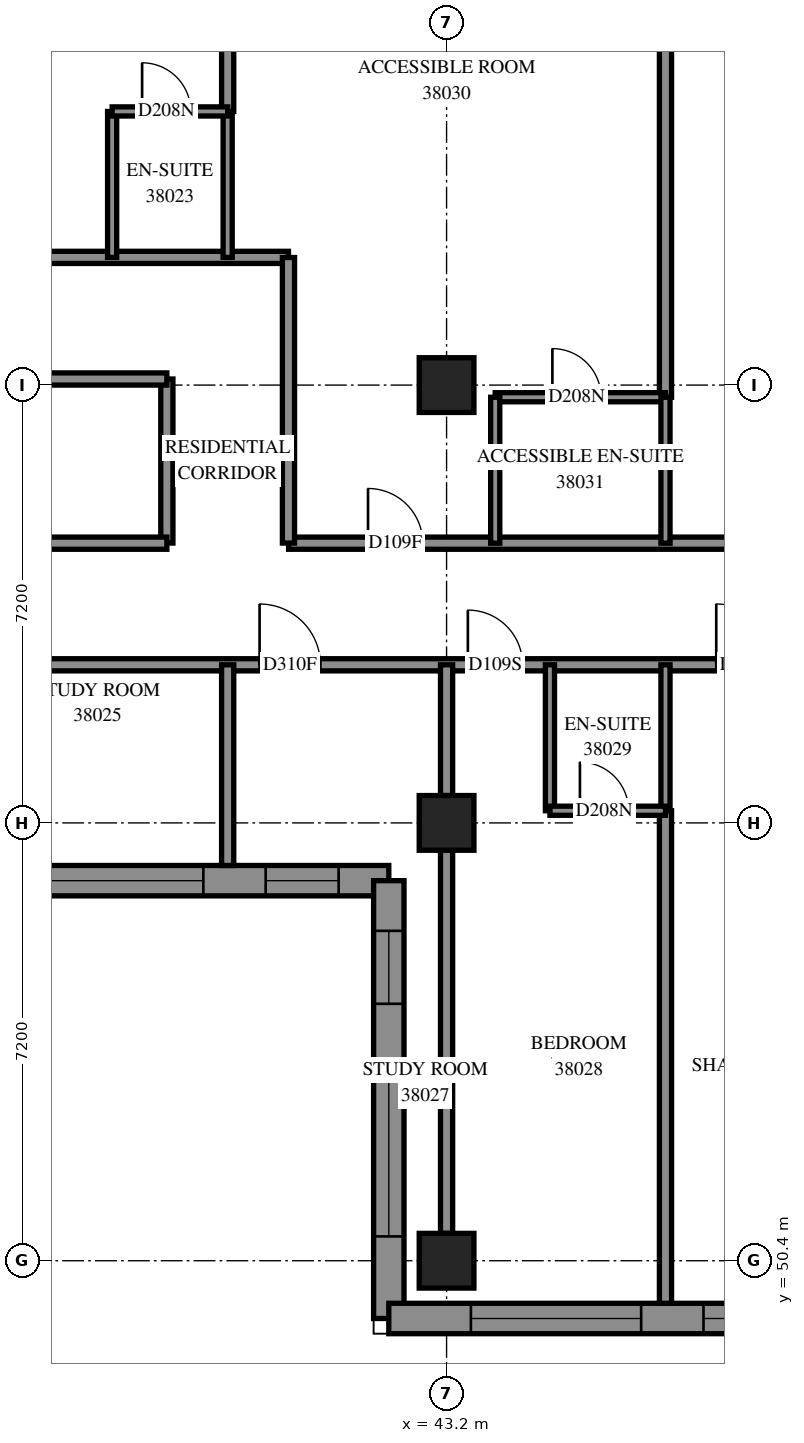
"""IFC4 building model, lengths in metres.
Left out: names, types, materials, properties, quantities, classifications, styles, units other than length and angle.
Written with IfcOpenShell. Run it as: python <this file> out.ifc"""

import sys

from ifc_helpers import new_model, si_unit, direction, frame, frame_2d, origin, origin_2d, place, context, subcontext, project, spatial, polyline, rectangle, outline, extrude, element, fill, save


model = new_model("IFC4")
c1 = context("Model", 3, precision=1e-05, world=origin(), true_north=direction((0.0, 1.0)))
c2 = subcontext(c1, "Body", "Model", "MODEL_VIEW")
j1 = project(units=[si_unit("LENGTHUNIT", "METRE"), si_unit("PLANEANGLEUNIT", "RADIAN")], contexts=[c1])
p1 = place(None, origin())
s1 = spatial("IfcSite", under=j1, at=p1, CompositionType="ELEMENT")
p2 = place(p1, origin())
s2 = spatial("IfcBuilding", under=s1, at=p2, CompositionType="ELEMENT")
p3 = place(p2, frame((0.0, 0.0, 142.2)))
s3 = spatial("IfcBuildingStorey", under=s2, at=p3, CompositionType="ELEMENT", Elevation=142.2)
for number, where, z_axis, x_axis in (
    (1, (43.2, 50.4, 0.0), (0.0, 0.0, 1.0), (1.0, 0.0, 0.0)),
    (2, (43.2, 57.6, 0.0), (0.0, 0.0, 1.0), (1.0, 0.0, 0.0)),
    (3, (43.2, 64.8, 0.0), (0.0, 0.0, 1.0), (1.0, 0.0, 0.0)),
):
    element("IfcColumn", number, at=place(p3, frame(where, z_axis=z_axis, x_axis=x_axis)), inside=s3, PredefinedType="COLUMN", context=c2, shape_type="SweptSolid", body=[
        extrude(rectangle(XDim=0.9, YDim=0.9, at=origin_2d()), origin(), (0.0, 0.0, 1.0), 3.1),
    ])
p4 = place(p3, frame((35.05, 56.65, 0.0), z_axis=(0.0, 0.0, 1.0), x_axis=(1.0, 0.0, 0.0)))
e4 = element("IfcWall", 4, at=p4, inside=s3, PredefinedType="SOLIDWALL", context=c2, shape_type="SweptSolid", body=[
    extrude(outline(polyline([(-0.25, -0.25), (6.95, -0.25), (7.45, 0.25), (0.25, 0.25), (-0.25, -0.25)])), origin(), (0.0, 0.0, 1.0), 3.1),
])
p5 = place(p4, frame((1.35, 0.0, 0.45)))
e5 = element("IfcOpeningElement", 5, at=p5, cuts=e4, PredefinedType="OPENING", context=c2, shape_type="SweptSolid", body=[
    extrude(rectangle(XDim=2.8, YDim=2.5, at=frame_2d((1.4, 1.25))), frame((0.0, 0.26, 0.0), z_axis=(0.0, -1.0, 0.0), x_axis=(1.0, 0.0, 0.0)), (0.0, 0.0, 1.0), 0.52),
])
p6 = place(p4, frame((5.175, 0.0, 0.45)))
e6 = element("IfcOpeningElement", 6, at=p6, cuts=e4, PredefinedType="OPENING", context=c2, shape_type="SweptSolid", body=[
    extrude(rectangle(XDim=1.2, YDim=2.5, at=frame_2d((0.6, 1.25))), frame((0.0, 0.26, 0.0), z_axis=(0.0, -1.0, 0.0), x_axis=(1.0, 0.0, 0.0)), (0.0, 0.0, 1.0), 0.52),
])
p7 = place(p3, frame((42.25, 56.65, 0.0), z_axis=(0.0, 0.0, 1.0), x_axis=(0.0, -1.0, 0.0)))
e7 = element("IfcWall", 7, at=p7, inside=s3, PredefinedType="SOLIDWALL", context=c2, shape_type="SweptSolid", body=[
    extrude(outline(polyline([(0.25, -0.25), (7.45, -0.25), (6.95, 0.25), (-0.25, 0.25), (0.25, -0.25)])), origin(), (0.0, 0.0, 1.0), 3.1),
])
p8 = place(p7, frame((3.05, 0.0, 0.45)))
e8 = element("IfcOpeningElement", 8, at=p8, cuts=e7, PredefinedType="OPENING", context=c2, shape_type="SweptSolid", body=[
    extrude(rectangle(XDim=2.8, YDim=2.5, at=frame_2d((1.4, 1.25))), frame((0.0, 0.26, 0.0), z_axis=(0.0, -1.0, 0.0), x_axis=(1.0, 0.0, 0.0)), (0.0, 0.0, 1.0), 0.52),
])
p9 = place(p7, frame((0.825, 0.0, 0.45)))
e9 = element("IfcOpeningElement", 9, at=p9, cuts=e7, PredefinedType="OPENING", context=c2, shape_type="SweptSolid", body=[
    extrude(rectangle(XDim=1.2, YDim=2.5, at=frame_2d((0.6, 1.25))), frame((0.0, 0.26, 0.0), z_axis=(0.0, -1.0, 0.0), x_axis=(1.0, 0.0, 0.0)), (0.0, 0.0, 1.0), 0.52),
])
p10 = place(p3, frame((42.25, 49.45, 0.0), z_axis=(0.0, 0.0, 1.0), x_axis=(1.0, 0.0, 0.0)))
e10 = element("IfcWall", 10, at=p10, inside=s3, PredefinedType="SOLIDWALL", context=c2, shape_type="SweptSolid", body=[
    extrude(outline(polyline([(-0.25, -0.25), (6.95, -0.25), (7.45, 0.25), (0.25, 0.25), (-0.25, -0.25)])), origin(), (0.0, 0.0, 1.0), 3.1),
])
p11 = place(p10, frame((1.35, 0.0, 0.45)))
e11 = element("IfcOpeningElement", 11, at=p11, cuts=e10, PredefinedType="OPENING", context=c2, shape_type="SweptSolid", body=[
    extrude(rectangle(XDim=2.8, YDim=2.5, at=frame_2d((1.4, 1.25))), frame((0.0, 0.26, 0.0), z_axis=(0.0, -1.0, 0.0), x_axis=(1.0, 0.0, 0.0)), (0.0, 0.0, 1.0), 0.52),
])
p12 = place(p10, frame((5.175, 0.0, 0.45)))
e12 = element("IfcOpeningElement", 12, at=p12, cuts=e10, PredefinedType="OPENING", context=c2, shape_type="SweptSolid", body=[
    extrude(rectangle(XDim=1.2, YDim=2.5, at=frame_2d((0.6, 1.25))), frame((0.0, 0.26, 0.0), z_axis=(0.0, -1.0, 0.0), x_axis=(1.0, 0.0, 0.0)), (0.0, 0.0, 1.0), 0.52),
])
p13 = place(p3, frame((21.6, 66.9, 0.0), z_axis=(0.0, 0.0, 1.0), x_axis=(1.0, 0.0, 0.0)))
e13 = element("IfcWall", 13, at=p13, inside=s3, PredefinedType="PARTITIONING", context=c2, shape_type="SweptSolid", body=[
    extrude(rectangle(XDim=19.0, YDim=0.2, at=frame_2d((9.5, 0.0))), origin(), (0.0, 0.0, 1.0), 3.1),
])
p14 = place(p13, frame((2.3, 0.0, 0.0)))
e14 = element("IfcOpeningElement", 14, at=p14, cuts=e13, PredefinedType="OPENING", context=c2, shape_type="SweptSolid", body=[
    extrude(rectangle(XDim=0.9, YDim=2.1, at=frame_2d((0.45, 1.05))), frame((0.0, 0.11, 0.0), z_axis=(0.0, -1.0, 0.0), x_axis=(1.0, 0.0, 0.0)), (0.0, 0.0, 1.0), 0.22),
])
p15 = place(p13, frame((5.957, 0.0, 0.0)))
e15 = element("IfcOpeningElement", 15, at=p15, cuts=e13, PredefinedType="OPENING", context=c2, shape_type="SweptSolid", body=[
    extrude(rectangle(XDim=0.9, YDim=2.1, at=frame_2d((0.45, 1.05))), frame((0.0, 0.11, 0.0), z_axis=(0.0, -1.0, 0.0), x_axis=(1.0, 0.0, 0.0)), (0.0, 0.0, 1.0), 0.22),
])
p16 = place(p13, frame((13.057, 0.0, 0.0)))
e16 = element("IfcOpeningElement", 16, at=p16, cuts=e13, PredefinedType="OPENING", context=c2, shape_type="SweptSolid", body=[
    extrude(rectangle(XDim=0.9, YDim=2.1, at=frame_2d((0.45, 1.05))), frame((0.0, 0.11, 0.0), z_axis=(0.0, -1.0, 0.0), x_axis=(1.0, 0.0, 0.0)), (0.0, 0.0, 1.0), 0.22),
])
p17 = place(p3, frame((36.0, 60.2, 0.0), z_axis=(0.0, 0.0, 1.0), x_axis=(1.0, 0.0, 0.0)))
e17 = element("IfcWall", 17, at=p17, inside=s3, PredefinedType="PARTITIONING", context=c2, shape_type="SweptSolid", body=[
    extrude(rectangle(XDim=17.0, YDim=0.2, at=frame_2d((8.5, 0.0))), origin(), (0.0, 0.0, 1.0), 3.1),
])
p18 = place(p17, frame((15.805, 0.0, 0.0)))
e18 = element("IfcOpeningElement", 18, at=p18, cuts=e17, PredefinedType="OPENING", context=c2, shape_type="SweptSolid", body=[
    extrude(rectangle(XDim=1.0, YDim=2.1, at=frame_2d((0.5, 1.05))), frame((0.0, 0.11, 0.0), z_axis=(0.0, -1.0, 0.0), x_axis=(1.0, 0.0, 0.0)), (0.0, 0.0, 1.0), 0.22),
])
p19 = place(p17, frame((4.125, 0.0, 0.0)))
e19 = element("IfcOpeningElement", 19, at=p19, cuts=e17, PredefinedType="OPENING", context=c2, shape_type="SweptSolid", body=[
    extrude(rectangle(XDim=1.0, YDim=2.1, at=frame_2d((0.5, 1.05))), frame((0.0, 0.11, 0.0), z_axis=(0.0, -1.0, 0.0), x_axis=(1.0, 0.0, 0.0)), (0.0, 0.0, 1.0), 0.22),
])
p20 = place(p17, frame((7.55, 0.0, 0.0)))
e20 = element("IfcOpeningElement", 20, at=p20, cuts=e17, PredefinedType="OPENING", context=c2, shape_type="SweptSolid", body=[
    extrude(rectangle(XDim=0.9, YDim=2.1, at=frame_2d((0.45, 1.05))), frame((0.0, 0.11, 0.0), z_axis=(0.0, -1.0, 0.0), x_axis=(1.0, 0.0, 0.0)), (0.0, 0.0, 1.0), 0.22),
])
p21 = place(p17, frame((11.635, 0.0, 0.0)))
e21 = element("IfcOpeningElement", 21, at=p21, cuts=e17, PredefinedType="OPENING", context=c2, shape_type="SweptSolid", body=[
    extrude(rectangle(XDim=1.0, YDim=2.1, at=frame_2d((0.5, 1.05))), frame((0.0, 0.11, 0.0), z_axis=(0.0, -1.0, 0.0), x_axis=(1.0, 0.0, 0.0)), (0.0, 0.0, 1.0), 0.22),
])
p22 = place(p3, frame((40.602, 62.2, 0.0), z_axis=(0.0, 0.0, 1.0), x_axis=(1.0, 0.0, 0.0)))
e22 = element("IfcWall", 22, at=p22, inside=s3, PredefinedType="PARTITIONING", context=c2, shape_type="SweptSolid", body=[
    extrude(rectangle(XDim=14.298, YDim=0.2, at=frame_2d((7.149, 0.0))), origin(), (0.0, 0.0, 1.0), 3.1),
])
p23 = place(p22, frame((1.306, 0.0, 0.0)))
e23 = element("IfcOpeningElement", 23, at=p23, cuts=e22, PredefinedType="OPENING", context=c2, shape_type="SweptSolid", body=[
    extrude(rectangle(XDim=0.9, YDim=2.1, at=frame_2d((0.45, 1.05))), frame((0.0, 0.11, 0.0), z_axis=(0.0, -1.0, 0.0), x_axis=(1.0, 0.0, 0.0)), (0.0, 0.0, 1.0), 0.22),
])
p24 = place(p22, frame((8.455, 0.0, 0.0)))
e24 = element("IfcOpeningElement", 24, at=p24, cuts=e22, PredefinedType="OPENING", context=c2, shape_type="SweptSolid", body=[
    extrude(rectangle(XDim=0.9, YDim=2.1, at=frame_2d((0.45, 1.05))), frame((0.0, 0.11, 0.0), z_axis=(0.0, -1.0, 0.0), x_axis=(1.0, 0.0, 0.0)), (0.0, 0.0, 1.0), 0.22),
])
p25 = place(p3, frame((46.8, 64.6, 0.0), z_axis=(0.0, 0.0, 1.0), x_axis=(0.0, 1.0, 0.0)))
e25 = element("IfcWall", 25, at=p25, inside=s3, PredefinedType="PARTITIONING", context=c2, shape_type="SweptSolid", body=[
    extrude(rectangle(XDim=8.176, YDim=0.2, at=frame_2d((4.088, 0.0))), origin(), (0.0, 0.0, 1.0), 3.1),
])
p26 = place(p3, frame((46.8, 49.7, 0.0), z_axis=(0.0, 0.0, 1.0), x_axis=(0.0, 1.0, 0.0)))
e26 = element("IfcWall", 26, at=p26, inside=s3, PredefinedType="PARTITIONING", context=c2, shape_type="SweptSolid", body=[
    extrude(rectangle(XDim=8.1, YDim=0.2, at=frame_2d((4.05, 0.0))), origin(), (0.0, 0.0, 1.0), 3.1),
])
p27 = place(p3, frame((43.2, 50.85, 0.0), z_axis=(0.0, 0.0, 1.0), x_axis=(0.0, 1.0, 0.0)))
e27 = element("IfcWall", 27, at=p27, inside=s3, PredefinedType="PARTITIONING", context=c2, shape_type="SweptSolid", body=[
    extrude(rectangle(XDim=6.3, YDim=0.2, at=frame_2d((3.15, 0.0))), origin(), (0.0, 0.0, 1.0), 2.6),
])
p28 = place(p3, frame((40.6, 62.202, 0.0), z_axis=(0.0, 0.0, 1.0), x_axis=(0.0, 1.0, 0.0)))
e28 = element("IfcWall", 28, at=p28, inside=s3, PredefinedType="PARTITIONING", context=c2, shape_type="SweptSolid", body=[
    extrude(rectangle(XDim=4.696, YDim=0.2, at=frame_2d((2.348, 0.0))), origin(), (0.0, 0.0, 1.0), 3.1),
])
p29 = place(p3, frame((39.6, 69.3, 0.0), z_axis=(0.0, 0.0, 1.0), x_axis=(0.0, 1.0, 0.0)))
e29 = element("IfcWall", 29, at=p29, inside=s3, PredefinedType="PARTITIONING", context=c2, shape_type="SweptSolid", body=[
    extrude(rectangle(XDim=3.513, YDim=0.2, at=frame_2d((1.756, 0.0))), origin(), (0.0, 0.0, 1.0), 3.1),
])
p30 = place(p3, frame((39.6, 56.9, 0.0), z_axis=(0.0, 0.0, 1.0), x_axis=(0.0, 1.0, 0.0)))
e30 = element("IfcWall", 30, at=p30, inside=s3, PredefinedType="PARTITIONING", context=c2, shape_type="SweptSolid", body=[
    extrude(rectangle(XDim=3.3, YDim=0.2, at=frame_2d((1.65, 0.0))), origin(), (0.0, 0.0, 1.0), 3.1),
])
p31 = place(p3, frame((44.0, 64.6, 0.0), z_axis=(0.0, 0.0, 1.0), x_axis=(1.0, 0.0, 0.0)))
e31 = element("IfcWall", 31, at=p31, inside=s3, PredefinedType="PARTITIONING", context=c2, shape_type="SweptSolid", body=[
    extrude(rectangle(XDim=2.8, YDim=0.15, at=frame_2d((1.4, 0.0))), origin(), (0.0, 0.0, 1.0), 3.1),
])
p32 = place(p31, frame((0.94, 0.0, 0.0)))
e32 = element("IfcOpeningElement", 32, at=p32, cuts=e31, PredefinedType="OPENING", context=c2, shape_type="SweptSolid", body=[
    extrude(rectangle(XDim=0.8, YDim=2.1, at=frame_2d((0.4, 1.05))), frame((0.0, 0.085, 0.0), z_axis=(0.0, -1.0, 0.0), x_axis=(1.0, 0.0, 0.0)), (0.0, 0.0, 1.0), 0.17),
])
p33 = place(p3, frame((38.6, 62.202, 0.0), z_axis=(0.0, 0.0, 1.0), x_axis=(0.0, 1.0, 0.0)))
e33 = element("IfcWall", 33, at=p33, inside=s3, PredefinedType="PARTITIONING", context=c2, shape_type="SweptSolid", body=[
    extrude(rectangle(XDim=2.698, YDim=0.2, at=frame_2d((1.349, 0.0))), origin(), (0.0, 0.0, 1.0), 3.1),
])
p34 = place(p3, frame((36.002, 62.2, 0.0), z_axis=(0.0, 0.0, 1.0), x_axis=(1.0, 0.0, 0.0)))
e34 = element("IfcWall", 34, at=p34, inside=s3, PredefinedType="PARTITIONING", context=c2, shape_type="SweptSolid", body=[
    extrude(rectangle(XDim=2.598, YDim=0.2, at=frame_2d((1.299, 0.0))), origin(), (0.0, 0.0, 1.0), 3.1),
])
for number, where, z_axis, x_axis in (
    (35, (44.9, 57.8, 0.0), (0.0, 0.0, 1.0), (0.0, 1.0, 0.0)),
    (36, (46.8, 57.8, 0.0), (0.0, 0.0, 1.0), (0.0, 1.0, 0.0)),
    (37, (37.7, 66.9, 0.0), (0.0, 0.0, 1.0), (0.0, 1.0, 0.0)),
    (38, (39.6, 66.9, 0.0), (0.0, 0.0, 1.0), (0.0, 1.0, 0.0)),
    (39, (44.0, 62.2, 0.0), (0.0, 0.0, 1.0), (0.0, 1.0, 0.0)),
    (40, (46.8, 62.2, 0.0), (0.0, 0.0, 1.0), (0.0, 1.0, 0.0)),
):
    element("IfcWall", number, at=place(p3, frame(where, z_axis=z_axis, x_axis=x_axis)), inside=s3, PredefinedType="PARTITIONING", context=c2, shape_type="SweptSolid", body=[
        extrude(rectangle(XDim=2.4, YDim=0.15, at=frame_2d((1.2, 0.0))), origin(), (0.0, 0.0, 1.0), 3.1),
    ])
for number, where, z_axis, x_axis in (
    (41, (43.2, 58.05, 0.0), (0.0, 0.0, 1.0), (0.0, 1.0, 0.0)),
    (42, (36.45, 64.9, 0.0), (0.0, 0.0, 1.0), (1.0, 0.0, 0.0)),
):
    element("IfcWall", number, at=place(p3, frame(where, z_axis=z_axis, x_axis=x_axis)), inside=s3, PredefinedType="PARTITIONING", context=c2, shape_type="SweptSolid", body=[
        extrude(rectangle(XDim=2.15, YDim=0.2, at=frame_2d((1.075, 0.0))), origin(), (0.0, 0.0, 1.0), 3.1),
    ])
p35 = place(p3, frame((37.7, 69.3, 0.0), z_axis=(0.0, 0.0, 1.0), x_axis=(1.0, 0.0, 0.0)))
e43 = element("IfcWall", 43, at=p35, inside=s3, PredefinedType="PARTITIONING", context=c2, shape_type="SweptSolid", body=[
    extrude(rectangle(XDim=1.9, YDim=0.15, at=frame_2d((0.95, 0.0))), origin(), (0.0, 0.0, 1.0), 3.1),
])
p36 = place(p35, frame((0.493, 0.0, 0.0)))
e44 = element("IfcOpeningElement", 44, at=p36, cuts=e43, PredefinedType="OPENING", context=c2, shape_type="SweptSolid", body=[
    extrude(rectangle(XDim=0.8, YDim=2.1, at=frame_2d((0.4, 1.05))), frame((0.0, 0.085, 0.0), z_axis=(0.0, -1.0, 0.0), x_axis=(1.0, 0.0, 0.0)), (0.0, 0.0, 1.0), 0.17),
])
p37 = place(p3, frame((44.9, 57.8, 0.0), z_axis=(0.0, 0.0, 1.0), x_axis=(1.0, 0.0, 0.0)))
e45 = element("IfcWall", 45, at=p37, inside=s3, PredefinedType="PARTITIONING", context=c2, shape_type="SweptSolid", body=[
    extrude(rectangle(XDim=1.9, YDim=0.15, at=frame_2d((0.95, 0.0))), origin(), (0.0, 0.0, 1.0), 3.1),
])
p38 = place(p37, frame((0.493, 0.0, 0.0)))
e46 = element("IfcOpeningElement", 46, at=p38, cuts=e45, PredefinedType="OPENING", context=c2, shape_type="SweptSolid", body=[
    extrude(rectangle(XDim=0.8, YDim=2.1, at=frame_2d((0.4, 1.05))), frame((0.0, 0.085, 0.0), z_axis=(0.0, -1.0, 0.0), x_axis=(1.0, 0.0, 0.0)), (0.0, 0.0, 1.0), 0.17),
])
p39 = place(p5, origin())
e47 = element("IfcWindow", 47, at=p39, inside=s3, PartitioningType="SINGLE_PANEL", PredefinedType="WINDOW", context=c2, shape_type="SweptSolid", body=[
    extrude(rectangle(XDim=2.8, YDim=2.5, at=frame_2d((1.4, 1.25))), frame((0.0, 0.18, 0.0), z_axis=(0.0, -1.0, 0.0), x_axis=(1.0, 0.0, 0.0)), (0.0, 0.0, 1.0), 0.06),
])
fill(e5, e47)
p40 = place(p6, origin())
e48 = element("IfcWindow", 48, at=p40, inside=s3, PartitioningType="SINGLE_PANEL", PredefinedType="WINDOW", context=c2, shape_type="SweptSolid", body=[
    extrude(rectangle(XDim=1.2, YDim=2.5, at=frame_2d((0.6, 1.25))), frame((0.0, 0.18, 0.0), z_axis=(0.0, -1.0, 0.0), x_axis=(1.0, 0.0, 0.0)), (0.0, 0.0, 1.0), 0.06),
])
fill(e6, e48)
p41 = place(p8, origin())
e49 = element("IfcWindow", 49, at=p41, inside=s3, PartitioningType="SINGLE_PANEL", PredefinedType="WINDOW", context=c2, shape_type="SweptSolid", body=[
    extrude(rectangle(XDim=2.8, YDim=2.5, at=frame_2d((1.4, 1.25))), frame((0.0, 0.18, 0.0), z_axis=(0.0, -1.0, 0.0), x_axis=(1.0, 0.0, 0.0)), (0.0, 0.0, 1.0), 0.06),
])
fill(e8, e49)
p42 = place(p9, origin())
e50 = element("IfcWindow", 50, at=p42, inside=s3, PartitioningType="SINGLE_PANEL", PredefinedType="WINDOW", context=c2, shape_type="SweptSolid", body=[
    extrude(rectangle(XDim=1.2, YDim=2.5, at=frame_2d((0.6, 1.25))), frame((0.0, 0.18, 0.0), z_axis=(0.0, -1.0, 0.0), x_axis=(1.0, 0.0, 0.0)), (0.0, 0.0, 1.0), 0.06),
])
fill(e9, e50)
p43 = place(p11, origin())
e51 = element("IfcWindow", 51, at=p43, inside=s3, PartitioningType="SINGLE_PANEL", PredefinedType="WINDOW", context=c2, shape_type="SweptSolid", body=[
    extrude(rectangle(XDim=2.8, YDim=2.5, at=frame_2d((1.4, 1.25))), frame((0.0, 0.18, 0.0), z_axis=(0.0, -1.0, 0.0), x_axis=(1.0, 0.0, 0.0)), (0.0, 0.0, 1.0), 0.06),
])
fill(e11, e51)
p44 = place(p12, origin())
e52 = element("IfcWindow", 52, at=p44, inside=s3, PartitioningType="SINGLE_PANEL", PredefinedType="WINDOW", context=c2, shape_type="SweptSolid", body=[
    extrude(rectangle(XDim=1.2, YDim=2.5, at=frame_2d((0.6, 1.25))), frame((0.0, 0.18, 0.0), z_axis=(0.0, -1.0, 0.0), x_axis=(1.0, 0.0, 0.0)), (0.0, 0.0, 1.0), 0.06),
])
fill(e12, e52)
p45 = place(p36, origin())
e53 = element("IfcDoor", 53, at=p45, inside=s3, OperationType="SINGLE_SWING_RIGHT", PredefinedType="DOOR", context=c2, shape_type="SweptSolid", body=[
    extrude(rectangle(XDim=0.8, YDim=2.1, at=frame_2d((0.4, 1.05))), frame((0.0, 0.025, 0.0), z_axis=(0.0, -1.0, 0.0), x_axis=(1.0, 0.0, 0.0)), (0.0, 0.0, 1.0), 0.05),
])
fill(e44, e53)
p46 = place(p19, origin())
e54 = element("IfcDoor", 54, at=p46, inside=s3, OperationType="SINGLE_SWING_RIGHT", PredefinedType="DOOR", context=c2, shape_type="SweptSolid", body=[
    extrude(rectangle(XDim=1.0, YDim=2.1, at=frame_2d((0.5, 1.05))), frame((0.0, 0.025, 0.0), z_axis=(0.0, -1.0, 0.0), x_axis=(1.0, 0.0, 0.0)), (0.0, 0.0, 1.0), 0.05),
])
fill(e19, e54)
p47 = place(p20, origin())
e55 = element("IfcDoor", 55, at=p47, inside=s3, OperationType="SINGLE_SWING_LEFT", PredefinedType="DOOR", context=c2, shape_type="SweptSolid", body=[
    extrude(rectangle(XDim=0.9, YDim=2.1, at=frame_2d((0.45, 1.05))), frame((0.0, 0.025, 0.0), z_axis=(0.0, -1.0, 0.0), x_axis=(1.0, 0.0, 0.0)), (0.0, 0.0, 1.0), 0.05),
])
fill(e20, e55)
p48 = place(p38, origin())
e56 = element("IfcDoor", 56, at=p48, inside=s3, OperationType="SINGLE_SWING_RIGHT", PredefinedType="DOOR", context=c2, shape_type="SweptSolid", body=[
    extrude(rectangle(XDim=0.8, YDim=2.1, at=frame_2d((0.4, 1.05))), frame((0.0, 0.025, 0.0), z_axis=(0.0, -1.0, 0.0), x_axis=(1.0, 0.0, 0.0)), (0.0, 0.0, 1.0), 0.05),
])
fill(e46, e56)
p49 = place(p23, origin())
e57 = element("IfcDoor", 57, at=p49, inside=s3, OperationType="SINGLE_SWING_LEFT", PredefinedType="DOOR", context=c2, shape_type="SweptSolid", body=[
    extrude(rectangle(XDim=0.9, YDim=2.1, at=frame_2d((0.45, 1.05))), frame((0.0, 0.025, 0.0), z_axis=(0.0, -1.0, 0.0), x_axis=(1.0, 0.0, 0.0)), (0.0, 0.0, 1.0), 0.05),
])
fill(e23, e57)
p50 = place(p32, origin())
e58 = element("IfcDoor", 58, at=p50, inside=s3, OperationType="SINGLE_SWING_RIGHT", PredefinedType="DOOR", context=c2, shape_type="SweptSolid", body=[
    extrude(rectangle(XDim=0.8, YDim=2.1, at=frame_2d((0.4, 1.05))), frame((0.0, 0.025, 0.0), z_axis=(0.0, -1.0, 0.0), x_axis=(1.0, 0.0, 0.0)), (0.0, 0.0, 1.0), 0.05),
])
fill(e32, e58)
p51 = place(p21, origin())
e59 = element("IfcDoor", 59, at=p51, inside=s3, OperationType="SINGLE_SWING_RIGHT", PredefinedType="DOOR", context=c2, shape_type="SweptSolid", body=[
    extrude(rectangle(XDim=1.0, YDim=2.1, at=frame_2d((0.5, 1.05))), frame((0.0, 0.025, 0.0), z_axis=(0.0, -1.0, 0.0), x_axis=(1.0, 0.0, 0.0)), (0.0, 0.0, 1.0), 0.05),
])
fill(e21, e59)
save(model, sys.argv[1])
